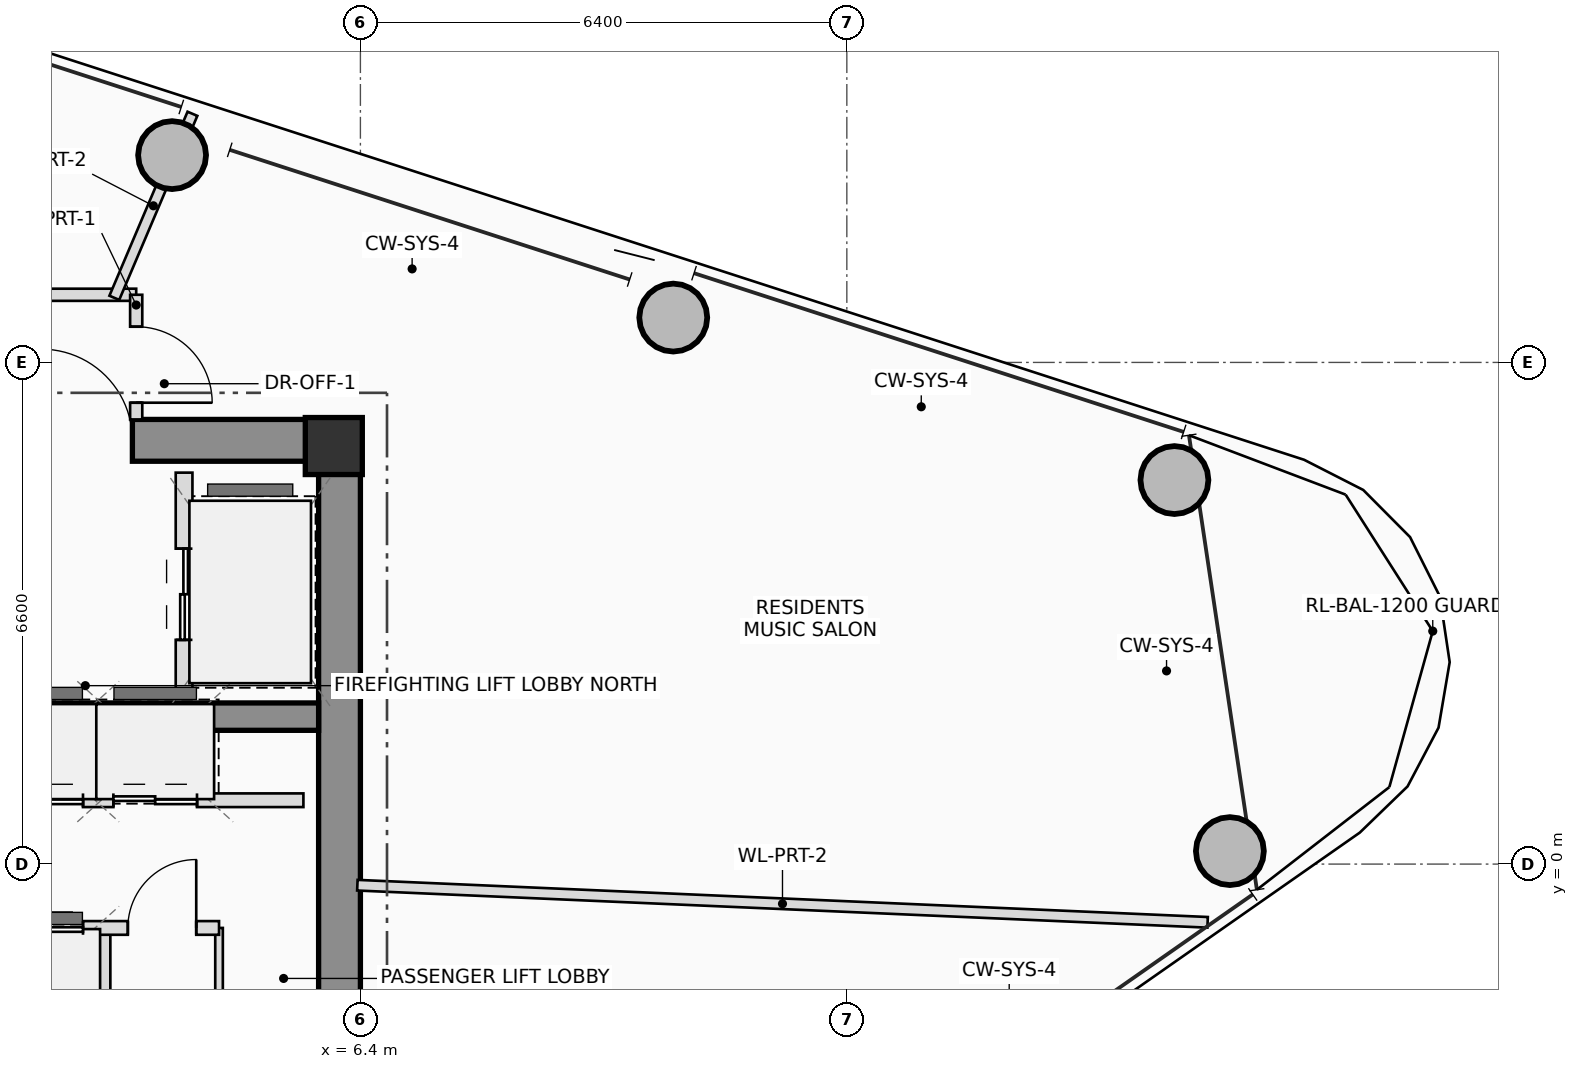
"""IFC4 building model, lengths in metres.
Left out: names, types, materials, properties, quantities, classifications, styles, units other than length and angle.
Written with IfcOpenShell. Run it as: python <this file> out.ifc"""

import sys

from ifc_helpers import new_model, si_unit, direction, frame, frame_2d, origin, origin_2d, place, context, subcontext, project, spatial, rectangle, hollow_circle, extrude, source, transform, mapped, element, fill, save


model = new_model("IFC4")
c1 = context("Model", 3, precision=1e-05, world=origin(), true_north=direction((0.0, 1.0)))
c2 = subcontext(c1, "Body", "Model", "MODEL_VIEW")
j1 = project(units=[si_unit("LENGTHUNIT", "METRE"), si_unit("PLANEANGLEUNIT", "RADIAN")], contexts=[c1])
p1 = place(None, origin())
s1 = spatial("IfcSite", under=j1, at=p1, CompositionType="ELEMENT")
p2 = place(p1, origin())
s2 = spatial("IfcBuilding", under=s1, at=p2, CompositionType="ELEMENT")
p3 = place(p2, frame((0.0, 0.0, 271.15)))
s3 = spatial("IfcBuildingStorey", under=s2, at=p3, CompositionType="ELEMENT", Elevation=271.15)
m1 = source(origin(), c2, "Body", "SweptSolid", [
    extrude(rectangle(XDim=0.75, YDim=0.75, at=origin_2d()), origin(), (0.0, 0.0, 1.0), 3.4),
])
p4 = place(p3, frame((6.05, 5.5, 0.0), z_axis=(0.0, 0.0, 1.0), x_axis=(1.0, 0.0, 0.0)))
e1 = element("IfcColumn", 1, at=p4, inside=s3, PredefinedType="COLUMN", context=c2, shape_type="MappedRepresentation", body=[
    mapped(m1, transform((0.0, 0.0, 0.0), scale=1.0)),
])
p5 = place(p3, frame((-6.4, 5.575, 0.0), z_axis=(0.0, 0.0, 1.0), x_axis=(1.0, 0.0, 0.0)))
e2 = element("IfcWall", 2, at=p5, inside=s3, PredefinedType="SHEAR", context=c2, shape_type="SweptSolid", body=[
    extrude(rectangle(XDim=12.8, YDim=0.55, at=frame_2d((6.4, 0.0))), origin(), (0.0, 0.0, 1.0), 3.4),
])
p6 = place(p5, frame((8.6, 0.0, 0.0)))
e3 = element("IfcOpeningElement", 3, at=p6, cuts=e2, PredefinedType="OPENING", context=c2, shape_type="SweptSolid", body=[
    extrude(rectangle(XDim=1.2, YDim=2.2, at=frame_2d((0.6, 1.1))), frame((0.0, 0.285, 0.0), z_axis=(0.0, -1.0, 0.0), x_axis=(1.0, 0.0, 0.0)), (0.0, 0.0, 1.0), 0.57),
])
p7 = place(p3, frame((6.125, -5.3, 0.0), z_axis=(0.0, 0.0, 1.0), x_axis=(0.0, 1.0, 0.0)))
e4 = element("IfcWall", 4, at=p7, inside=s3, PredefinedType="SHEAR", context=c2, shape_type="SweptSolid", body=[
    extrude(rectangle(XDim=10.6, YDim=0.55, at=frame_2d((5.3, 0.0))), origin(), (0.0, 0.0, 1.0), 3.4),
])
p8 = place(p3, frame((-5.85, 1.94, 0.0), z_axis=(0.0, 0.0, 1.0), x_axis=(1.0, 0.0, 0.0)))
e5 = element("IfcWall", 5, at=p8, inside=s3, PredefinedType="SHEAR", context=c2, shape_type="SweptSolid", body=[
    extrude(rectangle(XDim=11.7, YDim=0.36, at=frame_2d((5.85, 0.0))), origin(), (0.0, 0.0, 1.0), 3.4),
])
m2 = source(origin(), c2, "Body", "SweptSolid", [
    extrude(hollow_circle(Radius=0.45, WallThickness=0.032, at=origin_2d()), origin(), (0.0, 0.0, 1.0), 3.4),
])
for number, where, z_axis, x_axis in (
    (6, (17.84, 0.171, 0.0), (0.0, 0.0, 1.0), (1.0, 0.0, 0.0)),
    (7, (17.11, 5.052, 0.0), (0.0, 0.0, 1.0), (1.0, 0.0, 0.0)),
    (8, (10.516, 7.19, 0.0), (0.0, 0.0, 1.0), (1.0, 0.0, 0.0)),
    (9, (3.922, 9.327, 0.0), (0.0, 0.0, 1.0), (1.0, 0.0, 0.0)),
):
    element("IfcColumn", number, at=place(p3, frame(where, z_axis=z_axis, x_axis=x_axis)), inside=s3, PredefinedType="COLUMN", context=c2, shape_type="MappedRepresentation", body=[
        mapped(m2, transform((0.0, 0.0, 0.0), scale=1.0)),
    ])
p9 = place(p3, frame((4.08, 2.2, 0.0), z_axis=(0.0, 0.0, 1.0), x_axis=(0.0, 1.0, 0.0)))
e10 = element("IfcWall", 10, at=p9, inside=s3, PredefinedType="PLUMBINGWALL", context=c2, shape_type="SweptSolid", body=[
    extrude(rectangle(XDim=2.95, YDim=0.22, at=frame_2d((1.475, 0.0))), origin(), (0.0, 0.0, 1.0), 3.2),
])
p10 = place(p9, frame((0.75, 0.0, 0.0)))
e11 = element("IfcOpeningElement", 11, at=p10, cuts=e10, PredefinedType="OPENING", context=c2, shape_type="SweptSolid", body=[
    extrude(rectangle(XDim=1.2, YDim=2.25, at=frame_2d((0.6, 1.125))), frame((0.0, 0.12, 0.0), z_axis=(0.0, -1.0, 0.0), x_axis=(1.0, 0.0, 0.0)), (0.0, 0.0, 1.0), 0.24),
])
for number, where, z_axis, x_axis in (
    (12, (3.02, 0.84, 0.0), (0.0, 0.0, 1.0), (0.0, 1.0, 0.0)),
    (13, (4.38, 0.84, 0.0), (0.0, 0.0, 1.0), (0.0, 1.0, 0.0)),
    (14, (3.02, -1.82, 0.0), (0.0, 0.0, 1.0), (0.0, 1.0, 0.0)),
):
    element("IfcWall", number, at=place(p3, frame(where, z_axis=z_axis, x_axis=x_axis)), inside=s3, PredefinedType="PLUMBINGWALL", context=c2, shape_type="SweptSolid", body=[
        extrude(rectangle(XDim=0.98, YDim=0.18, at=frame_2d((0.49, 0.0))), origin(), (0.0, 0.0, 1.0), 3.2),
    ])
p11 = place(p3, frame((4.54, -1.82, 0.0), z_axis=(0.0, 0.0, 1.0), x_axis=(0.0, 1.0, 0.0)))
e15 = element("IfcWall", 15, at=p11, inside=s3, PredefinedType="PARTITIONING", context=c2, shape_type="SweptSolid", body=[
    extrude(rectangle(XDim=0.98, YDim=0.1, at=frame_2d((0.49, 0.0))), origin(), (0.0, 0.0, 1.0), 3.2),
])
p12 = place(p3, frame((-5.68, 0.84, 0.0), z_axis=(0.0, 0.0, 1.0), x_axis=(1.0, 0.0, 0.0)))
e16 = element("IfcWall", 16, at=p12, inside=s3, PredefinedType="PLUMBINGWALL", context=c2, shape_type="SweptSolid", body=[
    extrude(rectangle(XDim=11.33, YDim=0.18, at=frame_2d((5.665, 0.0))), origin(), (0.0, 0.0, 1.0), 3.2),
])
p13 = place(p12, frame((3.13, 0.0, 0.0)))
e17 = element("IfcOpeningElement", 17, at=p13, cuts=e16, PredefinedType="OPENING", context=c2, shape_type="SweptSolid", body=[
    extrude(rectangle(XDim=0.9, YDim=2.05, at=frame_2d((0.45, 1.025))), frame((0.0, 0.1, 0.0), z_axis=(0.0, -1.0, 0.0), x_axis=(1.0, 0.0, 0.0)), (0.0, 0.0, 1.0), 0.2),
])
p14 = place(p12, frame((7.33, 0.0, 0.0)))
e18 = element("IfcOpeningElement", 18, at=p14, cuts=e16, PredefinedType="OPENING", context=c2, shape_type="SweptSolid", body=[
    extrude(rectangle(XDim=1.1, YDim=2.2, at=frame_2d((0.55, 1.1))), frame((0.0, 0.1, 0.0), z_axis=(0.0, -1.0, 0.0), x_axis=(1.0, 0.0, 0.0)), (0.0, 0.0, 1.0), 0.2),
])
p15 = place(p12, frame((8.83, 0.0, 0.0)))
e19 = element("IfcOpeningElement", 19, at=p15, cuts=e16, PredefinedType="OPENING", context=c2, shape_type="SweptSolid", body=[
    extrude(rectangle(XDim=1.1, YDim=2.2, at=frame_2d((0.55, 1.1))), frame((0.0, 0.1, 0.0), z_axis=(0.0, -1.0, 0.0), x_axis=(1.0, 0.0, 0.0)), (0.0, 0.0, 1.0), 0.2),
])
p16 = place(p3, frame((-5.68, -0.84, 0.0), z_axis=(0.0, 0.0, 1.0), x_axis=(1.0, 0.0, 0.0)))
e20 = element("IfcWall", 20, at=p16, inside=s3, PredefinedType="PLUMBINGWALL", context=c2, shape_type="SweptSolid", body=[
    extrude(rectangle(XDim=10.22, YDim=0.18, at=frame_2d((5.11, 0.0))), origin(), (0.0, 0.0, 1.0), 3.2),
])
p17 = place(p16, frame((1.88, 0.0, 0.0)))
e21 = element("IfcOpeningElement", 21, at=p17, cuts=e20, PredefinedType="OPENING", context=c2, shape_type="SweptSolid", body=[
    extrude(rectangle(XDim=0.9, YDim=2.05, at=frame_2d((0.45, 1.025))), frame((0.0, 0.1, 0.0), z_axis=(0.0, -1.0, 0.0), x_axis=(1.0, 0.0, 0.0)), (0.0, 0.0, 1.0), 0.2),
])
p18 = place(p16, frame((5.35, 0.0, 0.0)))
e22 = element("IfcOpeningElement", 22, at=p18, cuts=e20, PredefinedType="OPENING", context=c2, shape_type="SweptSolid", body=[
    extrude(rectangle(XDim=0.9, YDim=2.05, at=frame_2d((0.45, 1.025))), frame((0.0, 0.1, 0.0), z_axis=(0.0, -1.0, 0.0), x_axis=(1.0, 0.0, 0.0)), (0.0, 0.0, 1.0), 0.2),
])
p19 = place(p16, frame((7.33, 0.0, 0.0)))
e23 = element("IfcOpeningElement", 23, at=p19, cuts=e20, PredefinedType="OPENING", context=c2, shape_type="SweptSolid", body=[
    extrude(rectangle(XDim=1.1, YDim=2.2, at=frame_2d((0.55, 1.1))), frame((0.0, 0.1, 0.0), z_axis=(0.0, -1.0, 0.0), x_axis=(1.0, 0.0, 0.0)), (0.0, 0.0, 1.0), 0.2),
])
p20 = place(p16, frame((9.02, 0.0, 0.0)))
e24 = element("IfcOpeningElement", 24, at=p20, cuts=e20, PredefinedType="OPENING", context=c2, shape_type="SweptSolid", body=[
    extrude(rectangle(XDim=0.9, YDim=2.05, at=frame_2d((0.45, 1.025))), frame((0.0, 0.1, 0.0), z_axis=(0.0, -1.0, 0.0), x_axis=(1.0, 0.0, 0.0)), (0.0, 0.0, 1.0), 0.2),
])
p21 = place(p3, frame((-6.36, 7.49, 0.0), z_axis=(0.0, 0.0, 1.0), x_axis=(1.0, 0.0, 0.0)))
e25 = element("IfcWall", 25, at=p21, inside=s3, PredefinedType="PARTITIONING", context=c2, shape_type="SweptSolid", body=[
    extrude(rectangle(XDim=9.81, YDim=0.16, at=frame_2d((4.905, 0.0))), origin(), (0.0, 0.0, 1.0), 2.605),
])
p22 = place(p21, frame((5.385, 0.0, 0.0)))
e26 = element("IfcOpeningElement", 26, at=p22, cuts=e25, PredefinedType="OPENING", context=c2, shape_type="SweptSolid", body=[
    extrude(rectangle(XDim=1.0, YDim=2.25, at=frame_2d((0.5, 1.125))), frame((0.0, 0.09, 0.0), z_axis=(0.0, -1.0, 0.0), x_axis=(1.0, 0.0, 0.0)), (0.0, 0.0, 1.0), 0.18),
])
p23 = place(p3, frame((3.45, 7.49, 0.0), z_axis=(0.0, 0.0, 1.0), x_axis=(0.0, -1.0, 0.0)))
e27 = element("IfcWall", 27, at=p23, inside=s3, PredefinedType="PARTITIONING", context=c2, shape_type="SweptSolid", body=[
    extrude(rectangle(XDim=1.64, YDim=0.16, at=frame_2d((0.82, 0.0))), origin(), (0.0, 0.0, 1.0), 2.805),
])
p24 = place(p23, frame((0.42, 0.0, 0.0)))
e28 = element("IfcOpeningElement", 28, at=p24, cuts=e27, PredefinedType="OPENING", context=c2, shape_type="SweptSolid", body=[
    extrude(rectangle(XDim=1.0, YDim=2.25, at=frame_2d((0.5, 1.125))), frame((0.0, 0.09, 0.0), z_axis=(0.0, -1.0, 0.0), x_axis=(1.0, 0.0, 0.0)), (0.0, 0.0, 1.0), 0.18),
])
p25 = place(p3, frame((6.36, -0.278, 0.0), z_axis=(0.0, 0.0, 1.0), x_axis=(0.999047788643, -0.043629302162, 0.0)))
e29 = element("IfcWall", 29, at=p25, inside=s3, PredefinedType="PARTITIONING", context=c2, shape_type="SweptSolid", body=[
    extrude(rectangle(XDim=11.197, YDim=0.14, at=frame_2d((5.599, 0.0))), origin(), (0.0, 0.0, 1.0), 2.765),
])
p26 = place(p3, frame((3.162, 7.45, 0.0), z_axis=(0.0, 0.0, 1.0), x_axis=(0.390769134848, 0.920488719784, 0.0)))
e30 = element("IfcWall", 30, at=p26, inside=s3, PredefinedType="PARTITIONING", context=c2, shape_type="SweptSolid", body=[
    extrude(rectangle(XDim=2.63, YDim=0.14, at=frame_2d((1.315, 0.0))), origin(), (0.0, 0.0, 1.0), 2.805),
])
p27 = place(p6, origin())
e31 = element("IfcDoor", 31, at=p27, inside=s3, OperationType="SINGLE_SWING_LEFT", PredefinedType="DOOR", context=c2, shape_type="SweptSolid", body=[
    extrude(rectangle(XDim=1.2, YDim=2.2, at=frame_2d((0.6, 1.1))), frame((0.0, 0.025, 0.0), z_axis=(0.0, -1.0, 0.0), x_axis=(1.0, 0.0, 0.0)), (0.0, 0.0, 1.0), 0.05),
])
fill(e3, e31)
p28 = place(p10, origin())
e32 = element("IfcDoor", 32, at=p28, inside=s3, OperationType="DOUBLE_DOOR_SLIDING", PredefinedType="DOOR", context=c2, shape_type="SweptSolid", body=[
    extrude(rectangle(XDim=1.2, YDim=2.25, at=frame_2d((0.6, 1.125))), frame((0.0, 0.025, 0.0), z_axis=(0.0, -1.0, 0.0), x_axis=(1.0, 0.0, 0.0)), (0.0, 0.0, 1.0), 0.05),
])
fill(e11, e32)
p29 = place(p14, origin())
e33 = element("IfcDoor", 33, at=p29, inside=s3, OperationType="DOUBLE_DOOR_SLIDING", PredefinedType="DOOR", context=c2, shape_type="SweptSolid", body=[
    extrude(rectangle(XDim=1.1, YDim=2.2, at=frame_2d((0.55, 1.1))), frame((0.0, 0.025, 0.0), z_axis=(0.0, -1.0, 0.0), x_axis=(1.0, 0.0, 0.0)), (0.0, 0.0, 1.0), 0.05),
])
fill(e18, e33)
p30 = place(p15, origin())
e34 = element("IfcDoor", 34, at=p30, inside=s3, OperationType="DOUBLE_DOOR_SLIDING", PredefinedType="DOOR", context=c2, shape_type="SweptSolid", body=[
    extrude(rectangle(XDim=1.1, YDim=2.2, at=frame_2d((0.55, 1.1))), frame((0.0, 0.025, 0.0), z_axis=(0.0, -1.0, 0.0), x_axis=(1.0, 0.0, 0.0)), (0.0, 0.0, 1.0), 0.05),
])
fill(e19, e34)
p31 = place(p19, origin())
e35 = element("IfcDoor", 35, at=p31, inside=s3, OperationType="DOUBLE_DOOR_SLIDING", PredefinedType="DOOR", context=c2, shape_type="SweptSolid", body=[
    extrude(rectangle(XDim=1.1, YDim=2.2, at=frame_2d((0.55, 1.1))), frame((0.0, 0.025, 0.0), z_axis=(0.0, -1.0, 0.0), x_axis=(1.0, 0.0, 0.0)), (0.0, 0.0, 1.0), 0.05),
])
fill(e23, e35)
p32 = place(p20, origin())
e36 = element("IfcDoor", 36, at=p32, inside=s3, OperationType="SINGLE_SWING_RIGHT", PredefinedType="DOOR", context=c2, shape_type="SweptSolid", body=[
    extrude(rectangle(XDim=0.9, YDim=2.05, at=frame_2d((0.45, 1.025))), frame((0.0, 0.025, 0.0), z_axis=(0.0, -1.0, 0.0), x_axis=(1.0, 0.0, 0.0)), (0.0, 0.0, 1.0), 0.05),
])
fill(e24, e36)
p33 = place(p24, origin())
e37 = element("IfcDoor", 37, at=p33, inside=s3, OperationType="SINGLE_SWING_RIGHT", PredefinedType="DOOR", context=c2, shape_type="SweptSolid", body=[
    extrude(rectangle(XDim=1.0, YDim=2.25, at=frame_2d((0.5, 1.125))), frame((0.0, 0.025, 0.0), z_axis=(0.0, -1.0, 0.0), x_axis=(1.0, 0.0, 0.0)), (0.0, 0.0, 1.0), 0.05),
])
fill(e28, e37)
save(model, sys.argv[1])
